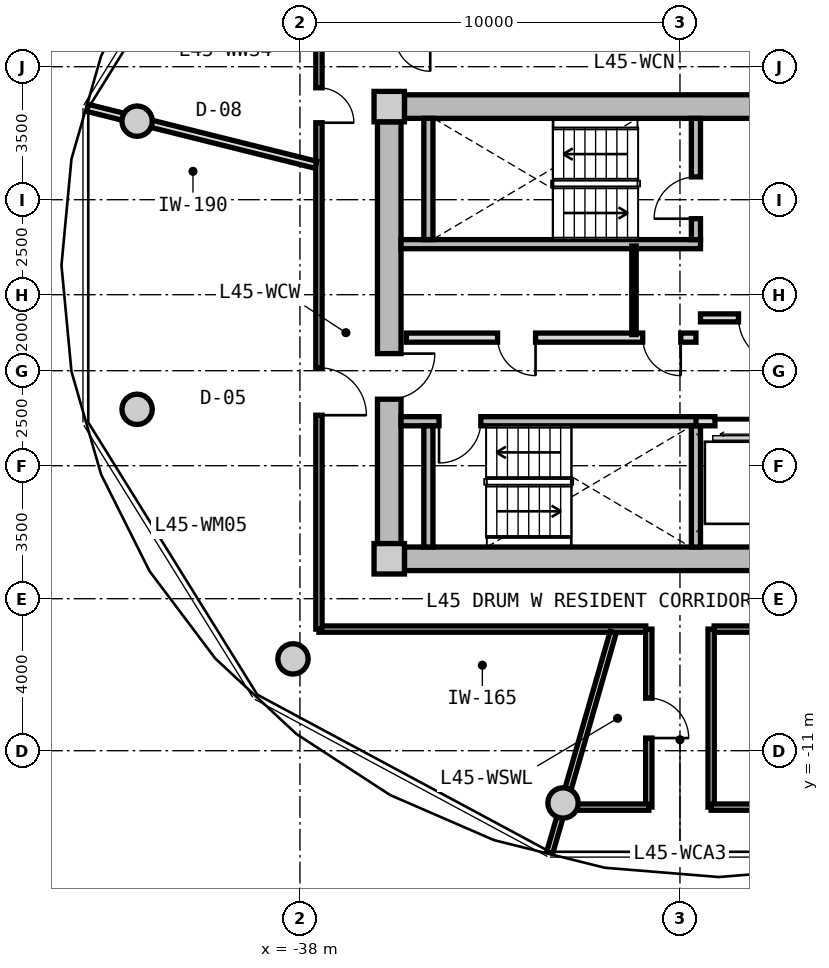
"""IFC4 building model, lengths in metres.
Left out: names, types, materials, properties, quantities, classifications, styles, units other than length and angle.
Written with IfcOpenShell. Run it as: python <this file> out.ifc"""

import sys

from ifc_helpers import new_model, si_unit, direction, frame, frame_2d, origin, origin_2d, place, context, subcontext, project, spatial, rectangle, circle, extrude, source, transform, mapped, element, fill, save


model = new_model("IFC4")
c1 = context("Model", 3, precision=1e-05, world=origin(), true_north=direction((0.0, 1.0)))
c2 = subcontext(c1, "Body", "Model", "MODEL_VIEW")
j1 = project(units=[si_unit("LENGTHUNIT", "METRE"), si_unit("PLANEANGLEUNIT", "RADIAN")], contexts=[c1])
p1 = place(None, origin())
s1 = spatial("IfcSite", under=j1, at=p1, CompositionType="ELEMENT")
p2 = place(p1, origin())
s2 = spatial("IfcBuilding", under=s1, at=p2, CompositionType="ELEMENT")
p3 = place(p2, frame((0.0, 0.0, 146.5)))
s3 = spatial("IfcBuildingStorey", under=s2, at=p3, CompositionType="ELEMENT", Elevation=146.5)
m1 = source(origin(), c2, "Body", "SweptSolid", [
    extrude(rectangle(XDim=0.8, YDim=0.8, at=origin_2d()), origin(), (0.0, 0.0, 1.0), 3.05),
])
for number, where, z_axis, x_axis in (
    (1, (-35.65, -5.95, 0.0), (0.0, 0.0, 1.0), (1.0, 0.0, 0.0)),
    (2, (-35.65, 5.95, 0.0), (0.0, 0.0, 1.0), (1.0, 0.0, 0.0)),
):
    element("IfcColumn", number, at=place(p3, frame(where, z_axis=z_axis, x_axis=x_axis)), inside=s3, PredefinedType="COLUMN", context=c2, shape_type="MappedRepresentation", body=[
        mapped(m1, transform((0.0, 0.0, 0.0), x_axis=(1.0, 0.0, 0.0), y_axis=(0.0, 1.0, 0.0), z_axis=(0.0, 0.0, 1.0), scale=1.0)),
    ])
m2 = source(origin(), c2, "Body", "SweptSolid", [
    extrude(rectangle(XDim=14.5, YDim=0.62, at=frame_2d((7.25, 0.0))), origin(), (0.0, 0.0, 1.0), 2.81),
])
for number, where, z_axis, x_axis in (
    (3, (-35.25, 5.95, 0.0), (0.0, 0.0, 1.0), (1.0, 0.0, 0.0)),
    (4, (-20.75, -5.95, 0.0), (0.0, 0.0, 1.0), (-1.0, 0.0, 0.0)),
):
    element("IfcWall", number, at=place(p3, frame(where, z_axis=z_axis, x_axis=x_axis)), inside=s3, PredefinedType="SHEAR", context=c2, shape_type="MappedRepresentation", body=[
        mapped(m2, transform((0.0, 0.0, 0.0), x_axis=(1.0, 0.0, 0.0), y_axis=(0.0, 1.0, 0.0), z_axis=(0.0, 0.0, 1.0), scale=1.0)),
    ])
m3 = source(origin(), c2, "Body", "SweptSolid", [
    extrude(rectangle(XDim=11.1, YDim=0.62, at=frame_2d((5.55, 0.0))), origin(), (0.0, 0.0, 1.0), 2.81),
])
p4 = place(p3, frame((-35.65, -5.55, 0.0), z_axis=(0.0, 0.0, 1.0), x_axis=(0.0, 1.0, 0.0)))
e5 = element("IfcWall", 5, at=p4, inside=s3, PredefinedType="SHEAR", context=c2, shape_type="MappedRepresentation", body=[
    mapped(m3, transform((0.0, 0.0, 0.0), x_axis=(1.0, 0.0, 0.0), y_axis=(0.0, 1.0, 0.0), z_axis=(0.0, 0.0, 1.0), scale=1.0)),
])
p5 = place(p4, frame((3.8, 0.0, 0.0)))
e6 = element("IfcOpeningElement", 6, at=p5, cuts=e5, PredefinedType="OPENING", context=c2, shape_type="SweptSolid", body=[
    extrude(rectangle(XDim=1.2, YDim=2.15, at=frame_2d((0.6, 1.075))), frame((0.0, 0.32, 0.0), z_axis=(0.0, -1.0, 0.0), x_axis=(1.0, 0.0, 0.0)), (0.0, 0.0, 1.0), 0.64),
])
m4 = source(origin(), c2, "Body", "SweptSolid", [
    extrude(circle(Radius=0.4, at=origin_2d()), origin(), (0.0, 0.0, 1.0), 3.05),
])
for number, where, z_axis, x_axis in (
    (7, (-42.285, 5.567, 0.0), (0.0, 0.0, 1.0), (1.0, 0.0, 0.0)),
    (8, (-42.285, -2.016, 0.0), (0.0, 0.0, 1.0), (1.0, 0.0, 0.0)),
    (9, (-38.183, -8.584, 0.0), (0.0, 0.0, 1.0), (1.0, 0.0, 0.0)),
    (10, (-31.077, -12.375, 0.0), (0.0, 0.0, 1.0), (1.0, 0.0, 0.0)),
):
    element("IfcColumn", number, at=place(p3, frame(where, z_axis=z_axis, x_axis=x_axis)), inside=s3, PredefinedType="COLUMN", context=c2, shape_type="MappedRepresentation", body=[
        mapped(m4, transform((0.0, 0.0, 0.0), x_axis=(1.0, 0.0, 0.0), y_axis=(0.0, 1.0, 0.0), z_axis=(0.0, 0.0, 1.0), scale=1.0)),
    ])
m5 = source(origin(), c2, "Body", "SweptSolid", [
    extrude(rectangle(XDim=7.88, YDim=0.24, at=frame_2d((3.94, 0.0))), origin(), (0.0, 0.0, 1.0), 2.81),
])
p6 = place(p3, frame((-35.34, 2.33, 0.0), z_axis=(0.0, 0.0, 1.0), x_axis=(1.0, 0.0, 0.0)))
e11 = element("IfcWall", 11, at=p6, inside=s3, PredefinedType="PARTITIONING", context=c2, shape_type="MappedRepresentation", body=[
    mapped(m5, transform((0.0, 0.0, 0.0), x_axis=(1.0, 0.0, 0.0), y_axis=(0.0, 1.0, 0.0), z_axis=(0.0, 0.0, 1.0), scale=1.0)),
])
m6 = source(origin(), c2, "Body", "SweptSolid", [
    extrude(rectangle(XDim=3.19, YDim=0.24, at=frame_2d((1.595, 0.0))), origin(), (0.0, 0.0, 1.0), 2.81),
])
p7 = place(p3, frame((-34.62, 2.45, 0.0), z_axis=(0.0, 0.0, 1.0), x_axis=(0.0, 1.0, 0.0)))
e12 = element("IfcWall", 12, at=p7, inside=s3, PredefinedType="PARTITIONING", context=c2, shape_type="MappedRepresentation", body=[
    mapped(m6, transform((0.0, 0.0, 0.0), x_axis=(1.0, 0.0, 0.0), y_axis=(0.0, 1.0, 0.0), z_axis=(0.0, 0.0, 1.0), scale=1.0)),
])
p8 = place(p3, frame((-27.58, 2.45, 0.0), z_axis=(0.0, 0.0, 1.0), x_axis=(0.0, 1.0, 0.0)))
e13 = element("IfcWall", 13, at=p8, inside=s3, PredefinedType="PARTITIONING", context=c2, shape_type="MappedRepresentation", body=[
    mapped(m6, transform((0.0, 0.0, 0.0), x_axis=(1.0, 0.0, 0.0), y_axis=(0.0, 1.0, 0.0), z_axis=(0.0, 0.0, 1.0), scale=1.0)),
])
p9 = place(p8, frame((0.55, 0.0, 0.0)))
e14 = element("IfcOpeningElement", 14, at=p9, cuts=e13, PredefinedType="OPENING", context=c2, shape_type="SweptSolid", body=[
    extrude(rectangle(XDim=1.1, YDim=2.15, at=frame_2d((0.55, 1.075))), frame((0.0, 0.13, 0.0), z_axis=(0.0, -1.0, 0.0), x_axis=(1.0, 0.0, 0.0)), (0.0, 0.0, 1.0), 0.26),
])
p10 = place(p3, frame((-35.34, -2.33, 0.0), z_axis=(0.0, 0.0, 1.0), x_axis=(1.0, 0.0, 0.0)))
e15 = element("IfcWall", 15, at=p10, inside=s3, PredefinedType="PARTITIONING", context=c2, shape_type="MappedRepresentation", body=[
    mapped(m5, transform((0.0, 0.0, 0.0), x_axis=(1.0, 0.0, 0.0), y_axis=(0.0, 1.0, 0.0), z_axis=(0.0, 0.0, 1.0), scale=1.0)),
])
p11 = place(p10, frame((1.0, 0.0, 0.0)))
e16 = element("IfcOpeningElement", 16, at=p11, cuts=e15, PredefinedType="OPENING", context=c2, shape_type="SweptSolid", body=[
    extrude(rectangle(XDim=1.1, YDim=2.15, at=frame_2d((0.55, 1.075))), frame((0.0, 0.13, 0.0), z_axis=(0.0, -1.0, 0.0), x_axis=(1.0, 0.0, 0.0)), (0.0, 0.0, 1.0), 0.26),
])
for number, where, z_axis, x_axis in (
    (17, (-34.62, -5.64, 0.0), (0.0, 0.0, 1.0), (0.0, 1.0, 0.0)),
    (18, (-27.58, -5.64, 0.0), (0.0, 0.0, 1.0), (0.0, 1.0, 0.0)),
):
    element("IfcWall", number, at=place(p3, frame(where, z_axis=z_axis, x_axis=x_axis)), inside=s3, PredefinedType="PARTITIONING", context=c2, shape_type="MappedRepresentation", body=[
        mapped(m6, transform((0.0, 0.0, 0.0), x_axis=(1.0, 0.0, 0.0), y_axis=(0.0, 1.0, 0.0), z_axis=(0.0, 0.0, 1.0), scale=1.0)),
    ])
m7 = source(origin(), c2, "Body", "SweptSolid", [
    extrude(rectangle(XDim=6.66, YDim=0.21, at=frame_2d((3.33, 0.0))), origin(), (0.0, 0.0, 1.0), 2.795),
])
p12 = place(p3, frame((-27.46, 0.39, 0.0), z_axis=(0.0, 0.0, 1.0), x_axis=(1.0, 0.0, 0.0)))
e19 = element("IfcWall", 19, at=p12, inside=s3, PredefinedType="PARTITIONING", context=c2, shape_type="MappedRepresentation", body=[
    mapped(m7, transform((0.0, 0.0, 0.0), x_axis=(1.0, 0.0, 0.0), y_axis=(0.0, 1.0, 0.0), z_axis=(0.0, 0.0, 1.0), scale=1.0)),
])
p13 = place(p12, frame((1.0, 0.0, 0.0)))
e20 = element("IfcOpeningElement", 20, at=p13, cuts=e19, PredefinedType="OPENING", context=c2, shape_type="SweptSolid", body=[
    extrude(rectangle(XDim=1.2, YDim=2.15, at=frame_2d((0.6, 1.075))), frame((0.0, 0.115, 0.0), z_axis=(0.0, -1.0, 0.0), x_axis=(1.0, 0.0, 0.0)), (0.0, 0.0, 1.0), 0.23),
])
m8 = source(origin(), c2, "Body", "SweptSolid", [
    extrude(rectangle(XDim=7.62, YDim=0.24, at=frame_2d((3.81, 0.0))), origin(), (0.0, 0.0, 1.0), 2.795),
])
p14 = place(p3, frame((-35.2, -0.13, 0.0), z_axis=(0.0, 0.0, 1.0), x_axis=(1.0, 0.0, 0.0)))
e21 = element("IfcWall", 21, at=p14, inside=s3, PredefinedType="PARTITIONING", context=c2, shape_type="MappedRepresentation", body=[
    mapped(m8, transform((0.0, 0.0, 0.0), x_axis=(1.0, 0.0, 0.0), y_axis=(0.0, 1.0, 0.0), z_axis=(0.0, 0.0, 1.0), scale=1.0)),
])
p15 = place(p14, frame((6.22, 0.0, 0.0)))
e22 = element("IfcOpeningElement", 22, at=p15, cuts=e21, PredefinedType="OPENING", context=c2, shape_type="SweptSolid", body=[
    extrude(rectangle(XDim=1.0, YDim=2.1, at=frame_2d((0.5, 1.05))), frame((0.0, 0.13, 0.0), z_axis=(0.0, -1.0, 0.0), x_axis=(1.0, 0.0, 0.0)), (0.0, 0.0, 1.0), 0.26),
])
p16 = place(p14, frame((2.4, 0.0, 0.0)))
e23 = element("IfcOpeningElement", 23, at=p16, cuts=e21, PredefinedType="OPENING", context=c2, shape_type="SweptSolid", body=[
    extrude(rectangle(XDim=1.0, YDim=2.1, at=frame_2d((0.5, 1.05))), frame((0.0, 0.13, 0.0), z_axis=(0.0, -1.0, 0.0), x_axis=(1.0, 0.0, 0.0)), (0.0, 0.0, 1.0), 0.26),
])
m9 = source(origin(), c2, "Body", "SweptSolid", [
    extrude(rectangle(XDim=2.33, YDim=0.115, at=frame_2d((1.165, 0.0))), origin(), (0.0, 0.0, 1.0), 2.795),
])
p17 = place(p3, frame((-29.21, -0.05, 0.0), z_axis=(0.0, 0.0, 1.0), x_axis=(0.0, 1.0, 0.0)))
e24 = element("IfcWall", 24, at=p17, inside=s3, PredefinedType="PARTITIONING", context=c2, shape_type="MappedRepresentation", body=[
    mapped(m9, transform((0.0, 0.0, 0.0), x_axis=(1.0, 0.0, 0.0), y_axis=(0.0, 1.0, 0.0), z_axis=(0.0, 0.0, 1.0), scale=1.0)),
])
m10 = source(origin(), c2, "Body", "SweptSolid", [
    extrude(rectangle(XDim=4.13, YDim=0.24, at=frame_2d((2.065, 0.0))), origin(), (0.0, 0.0, 1.0), 2.795),
])
p18 = place(p3, frame((-27.58, -2.33, 0.0), z_axis=(0.0, 0.0, 1.0), x_axis=(1.0, 0.0, 0.0)))
e25 = element("IfcWall", 25, at=p18, inside=s3, PredefinedType="PARTITIONING", context=c2, shape_type="MappedRepresentation", body=[
    mapped(m10, transform((0.0, 0.0, 0.0), x_axis=(1.0, 0.0, 0.0), y_axis=(0.0, 1.0, 0.0), z_axis=(0.0, 0.0, 1.0), scale=1.0)),
])
p19 = place(p18, frame((0.5, 0.0, 0.0)))
e26 = element("IfcOpeningElement", 26, at=p19, cuts=e25, PredefinedType="OPENING", context=c2, shape_type="SweptSolid", body=[
    extrude(rectangle(XDim=1.1, YDim=2.2, at=frame_2d((0.55, 1.1))), frame((0.0, 0.13, 0.0), z_axis=(0.0, -1.0, 0.0), x_axis=(1.0, 0.0, 0.0)), (0.0, 0.0, 1.0), 0.26),
])
m11 = source(origin(), c2, "Body", "SweptSolid", [
    extrude(rectangle(XDim=8.6, YDim=0.165, at=frame_2d((4.3, 0.0))), origin(), (0.0, 0.0, 1.0), 2.795),
])
p20 = place(p3, frame((-18.5, -7.8, 0.0), z_axis=(0.0, 0.0, 1.0), x_axis=(-1.0, 0.0, 0.0)))
e27 = element("IfcWall", 27, at=p20, inside=s3, PredefinedType="PARTITIONING", context=c2, shape_type="MappedRepresentation", body=[
    mapped(m11, transform((0.0, 0.0, 0.0), x_axis=(1.0, 0.0, 0.0), y_axis=(0.0, 1.0, 0.0), z_axis=(0.0, 0.0, 1.0), scale=1.0)),
])
p21 = place(p20, frame((3.775, 0.0, 0.0)))
e28 = element("IfcOpeningElement", 28, at=p21, cuts=e27, PredefinedType="OPENING", context=c2, shape_type="SweptSolid", body=[
    extrude(rectangle(XDim=1.05, YDim=2.15, at=frame_2d((0.525, 1.075))), frame((0.0, 0.093, 0.0), z_axis=(0.0, -1.0, 0.0), x_axis=(1.0, 0.0, 0.0)), (0.0, 0.0, 1.0), 0.185),
])
p22 = place(p3, frame((-28.9, -7.8, 0.0), z_axis=(0.0, 0.0, 1.0), x_axis=(-1.0, 0.0, 0.0)))
e29 = element("IfcWall", 29, at=p22, inside=s3, PredefinedType="PARTITIONING", context=c2, shape_type="MappedRepresentation", body=[
    mapped(m11, transform((0.0, 0.0, 0.0), x_axis=(1.0, 0.0, 0.0), y_axis=(0.0, 1.0, 0.0), z_axis=(0.0, 0.0, 1.0), scale=1.0)),
])
m12 = source(origin(), c2, "Body", "SweptSolid", [
    extrude(rectangle(XDim=15.6, YDim=0.165, at=frame_2d((7.8, 0.0))), origin(), (0.0, 0.0, 1.0), 2.795),
])
p23 = place(p3, frame((-37.5, -7.8, 0.0), z_axis=(0.0, 0.0, 1.0), x_axis=(0.0, 1.0, 0.0)))
e30 = element("IfcWall", 30, at=p23, inside=s3, PredefinedType="PARTITIONING", context=c2, shape_type="MappedRepresentation", body=[
    mapped(m12, transform((0.0, 0.0, 0.0), x_axis=(1.0, 0.0, 0.0), y_axis=(0.0, 1.0, 0.0), z_axis=(0.0, 0.0, 1.0), scale=1.0)),
])
p24 = place(p23, frame((13.325, 0.0, 0.0)))
e31 = element("IfcOpeningElement", 31, at=p24, cuts=e30, PredefinedType="OPENING", context=c2, shape_type="SweptSolid", body=[
    extrude(rectangle(XDim=0.92, YDim=2.1, at=frame_2d((0.46, 1.05))), frame((0.0, 0.093, 0.0), z_axis=(0.0, -1.0, 0.0), x_axis=(1.0, 0.0, 0.0)), (0.0, 0.0, 1.0), 0.185),
])
p25 = place(p23, frame((5.628, 0.0, 0.0)))
e32 = element("IfcOpeningElement", 32, at=p25, cuts=e30, PredefinedType="OPENING", context=c2, shape_type="SweptSolid", body=[
    extrude(rectangle(XDim=1.25, YDim=2.2, at=frame_2d((0.625, 1.1))), frame((0.0, 0.093, 0.0), z_axis=(0.0, -1.0, 0.0), x_axis=(1.0, 0.0, 0.0)), (0.0, 0.0, 1.0), 0.185),
])
m13 = source(origin(), c2, "Body", "SweptSolid", [
    extrude(rectangle(XDim=6.035, YDim=0.165, at=frame_2d((3.018, 0.0))), origin(), (0.0, 0.0, 1.0), 2.345),
])
p26 = place(p3, frame((-29.756, -7.88, 0.0), z_axis=(0.0, 0.0, 1.0), x_axis=(-0.276809454862, -0.960924828329, 0.0)))
e33 = element("IfcWall", 33, at=p26, inside=s3, PredefinedType="PARTITIONING", context=c2, shape_type="MappedRepresentation", body=[
    mapped(m13, transform((0.0, 0.0, 0.0), x_axis=(1.0, 0.0, 0.0), y_axis=(0.0, 1.0, 0.0), z_axis=(0.0, 0.0, 1.0), scale=1.0)),
])
m14 = source(origin(), c2, "Body", "SweptSolid", [
    extrude(rectangle(XDim=4.685, YDim=0.165, at=frame_2d((2.342, 0.0))), origin(), (0.0, 0.0, 1.0), 2.795),
])
p27 = place(p3, frame((-28.82, -12.485, 0.0), z_axis=(0.0, 0.0, 1.0), x_axis=(0.0, 1.0, 0.0)))
e34 = element("IfcWall", 34, at=p27, inside=s3, PredefinedType="PARTITIONING", context=c2, shape_type="MappedRepresentation", body=[
    mapped(m14, transform((0.0, 0.0, 0.0), x_axis=(1.0, 0.0, 0.0), y_axis=(0.0, 1.0, 0.0), z_axis=(0.0, 0.0, 1.0), scale=1.0)),
])
p28 = place(p27, frame((1.817, 0.0, 0.0)))
e35 = element("IfcOpeningElement", 35, at=p28, cuts=e34, PredefinedType="OPENING", context=c2, shape_type="SweptSolid", body=[
    extrude(rectangle(XDim=1.05, YDim=2.15, at=frame_2d((0.525, 1.075))), frame((0.0, 0.093, 0.0), z_axis=(0.0, -1.0, 0.0), x_axis=(1.0, 0.0, 0.0)), (0.0, 0.0, 1.0), 0.185),
])
m15 = source(origin(), c2, "Body", "SweptSolid", [
    extrude(rectangle(XDim=2.419, YDim=0.165, at=frame_2d((1.209, 0.0))), origin(), (0.0, 0.0, 1.0), 2.345),
])
p29 = place(p3, frame((-31.239, -12.485, 0.0), z_axis=(0.0, 0.0, 1.0), x_axis=(1.0, 0.0, 0.0)))
e36 = element("IfcWall", 36, at=p29, inside=s3, PredefinedType="PARTITIONING", context=c2, shape_type="MappedRepresentation", body=[
    mapped(m15, transform((0.0, 0.0, 0.0), x_axis=(1.0, 0.0, 0.0), y_axis=(0.0, 1.0, 0.0), z_axis=(0.0, 0.0, 1.0), scale=1.0)),
])
p30 = place(p3, frame((-27.18, -12.485, 0.0), z_axis=(0.0, 0.0, 1.0), x_axis=(0.0, 1.0, 0.0)))
e37 = element("IfcWall", 37, at=p30, inside=s3, PredefinedType="PARTITIONING", context=c2, shape_type="MappedRepresentation", body=[
    mapped(m14, transform((0.0, 0.0, 0.0), x_axis=(1.0, 0.0, 0.0), y_axis=(0.0, 1.0, 0.0), z_axis=(0.0, 0.0, 1.0), scale=1.0)),
])
m16 = source(origin(), c2, "Body", "SweptSolid", [
    extrude(rectangle(XDim=7.139, YDim=0.165, at=frame_2d((3.569, 0.0))), origin(), (0.0, 0.0, 1.0), 2.345),
])
p31 = place(p3, frame((-27.18, -12.485, 0.0), z_axis=(0.0, 0.0, 1.0), x_axis=(1.0, 0.0, 0.0)))
e38 = element("IfcWall", 38, at=p31, inside=s3, PredefinedType="PARTITIONING", context=c2, shape_type="MappedRepresentation", body=[
    mapped(m16, transform((0.0, 0.0, 0.0), x_axis=(1.0, 0.0, 0.0), y_axis=(0.0, 1.0, 0.0), z_axis=(0.0, 0.0, 1.0), scale=1.0)),
])
m17 = source(origin(), c2, "Body", "SweptSolid", [
    extrude(rectangle(XDim=6.193, YDim=0.19, at=frame_2d((3.096, 0.0))), origin(), (0.0, 0.0, 1.0), 2.345),
])
p32 = place(p3, frame((-37.58, 4.419, 0.0), z_axis=(0.0, 0.0, 1.0), x_axis=(-0.970309243466, 0.241867674657, 0.0)))
e39 = element("IfcWall", 39, at=p32, inside=s3, PredefinedType="PARTITIONING", context=c2, shape_type="MappedRepresentation", body=[
    mapped(m17, transform((0.0, 0.0, 0.0), x_axis=(1.0, 0.0, 0.0), y_axis=(0.0, 1.0, 0.0), z_axis=(0.0, 0.0, 1.0), scale=1.0)),
])
m18 = source(origin(), c2, "Body", "SweptSolid", [
    extrude(rectangle(XDim=1.1, YDim=2.15, at=frame_2d((0.55, 1.075))), frame((0.0, 0.025, 0.0), z_axis=(0.0, -1.0, 0.0), x_axis=(1.0, 0.0, 0.0)), (0.0, 0.0, 1.0), 0.05),
])
p33 = place(p9, origin())
e40 = element("IfcDoor", 40, at=p33, inside=s3, OperationType="SINGLE_SWING_LEFT", PredefinedType="DOOR", context=c2, shape_type="MappedRepresentation", body=[
    mapped(m18, transform((0.0, 0.0, 0.0), x_axis=(1.0, 0.0, 0.0), y_axis=(0.0, 1.0, 0.0), z_axis=(0.0, 0.0, 1.0), scale=1.0)),
])
fill(e14, e40)
p34 = place(p11, frame((1.1, 0.0, 0.0), z_axis=(0.0, 0.0, 1.0), x_axis=(-1.0, 0.0, 0.0)))
e41 = element("IfcDoor", 41, at=p34, inside=s3, OperationType="SINGLE_SWING_RIGHT", PredefinedType="DOOR", context=c2, shape_type="MappedRepresentation", body=[
    mapped(m18, transform((0.0, 0.0, 0.0), x_axis=(1.0, 0.0, 0.0), y_axis=(0.0, 1.0, 0.0), z_axis=(0.0, 0.0, 1.0), scale=1.0)),
])
fill(e16, e41)
m19 = source(origin(), c2, "Body", "SweptSolid", [
    extrude(rectangle(XDim=1.2, YDim=2.15, at=frame_2d((0.6, 1.075))), frame((0.0, 0.025, 0.0), z_axis=(0.0, -1.0, 0.0), x_axis=(1.0, 0.0, 0.0)), (0.0, 0.0, 1.0), 0.05),
])
p35 = place(p13, frame((1.2, 0.0, 0.0), z_axis=(0.0, 0.0, 1.0), x_axis=(-1.0, 0.0, 0.0)))
e42 = element("IfcDoor", 42, at=p35, inside=s3, OperationType="SINGLE_SWING_LEFT", PredefinedType="DOOR", context=c2, shape_type="MappedRepresentation", body=[
    mapped(m19, transform((0.0, 0.0, 0.0), x_axis=(1.0, 0.0, 0.0), y_axis=(0.0, 1.0, 0.0), z_axis=(0.0, 0.0, 1.0), scale=1.0)),
])
fill(e20, e42)
p36 = place(p5, frame((1.2, 0.0, 0.0), z_axis=(0.0, 0.0, 1.0), x_axis=(-1.0, 0.0, 0.0)))
e43 = element("IfcDoor", 43, at=p36, inside=s3, OperationType="SINGLE_SWING_LEFT", PredefinedType="DOOR", context=c2, shape_type="MappedRepresentation", body=[
    mapped(m19, transform((0.0, 0.0, 0.0), x_axis=(1.0, 0.0, 0.0), y_axis=(0.0, 1.0, 0.0), z_axis=(0.0, 0.0, 1.0), scale=1.0)),
])
fill(e6, e43)
m20 = source(origin(), c2, "Body", "SweptSolid", [
    extrude(rectangle(XDim=1.0, YDim=2.1, at=frame_2d((0.5, 1.05))), frame((0.0, 0.025, 0.0), z_axis=(0.0, -1.0, 0.0), x_axis=(1.0, 0.0, 0.0)), (0.0, 0.0, 1.0), 0.05),
])
p37 = place(p15, frame((1.0, 0.0, 0.0), z_axis=(0.0, 0.0, 1.0), x_axis=(-1.0, 0.0, 0.0)))
e44 = element("IfcDoor", 44, at=p37, inside=s3, OperationType="SINGLE_SWING_LEFT", PredefinedType="DOOR", context=c2, shape_type="MappedRepresentation", body=[
    mapped(m20, transform((0.0, 0.0, 0.0), x_axis=(1.0, 0.0, 0.0), y_axis=(0.0, 1.0, 0.0), z_axis=(0.0, 0.0, 1.0), scale=1.0)),
])
fill(e22, e44)
p38 = place(p16, frame((1.0, 0.0, 0.0), z_axis=(0.0, 0.0, 1.0), x_axis=(-1.0, 0.0, 0.0)))
e45 = element("IfcDoor", 45, at=p38, inside=s3, OperationType="SINGLE_SWING_LEFT", PredefinedType="DOOR", context=c2, shape_type="MappedRepresentation", body=[
    mapped(m20, transform((0.0, 0.0, 0.0), x_axis=(1.0, 0.0, 0.0), y_axis=(0.0, 1.0, 0.0), z_axis=(0.0, 0.0, 1.0), scale=1.0)),
])
fill(e23, e45)
m21 = source(origin(), c2, "Body", "SweptSolid", [
    extrude(rectangle(XDim=1.1, YDim=2.2, at=frame_2d((0.55, 1.1))), frame((0.0, 0.025, 0.0), z_axis=(0.0, -1.0, 0.0), x_axis=(1.0, 0.0, 0.0)), (0.0, 0.0, 1.0), 0.05),
])
p39 = place(p19, frame((1.1, 0.0, 0.0), z_axis=(0.0, 0.0, 1.0), x_axis=(-1.0, 0.0, 0.0)))
e46 = element("IfcDoor", 46, at=p39, inside=s3, OperationType="SLIDING_TO_LEFT", PredefinedType="DOOR", context=c2, shape_type="MappedRepresentation", body=[
    mapped(m21, transform((0.0, 0.0, 0.0), x_axis=(1.0, 0.0, 0.0), y_axis=(0.0, 1.0, 0.0), z_axis=(0.0, 0.0, 1.0), scale=1.0)),
])
fill(e26, e46)
m22 = source(origin(), c2, "Body", "SweptSolid", [
    extrude(rectangle(XDim=1.05, YDim=2.15, at=frame_2d((0.525, 1.075))), frame((0.0, 0.025, 0.0), z_axis=(0.0, -1.0, 0.0), x_axis=(1.0, 0.0, 0.0)), (0.0, 0.0, 1.0), 0.05),
])
p40 = place(p28, frame((1.05, 0.0, 0.0), z_axis=(0.0, 0.0, 1.0), x_axis=(-1.0, 0.0, 0.0)))
e47 = element("IfcDoor", 47, at=p40, inside=s3, OperationType="SINGLE_SWING_RIGHT", PredefinedType="DOOR", context=c2, shape_type="MappedRepresentation", body=[
    mapped(m22, transform((0.0, 0.0, 0.0), x_axis=(1.0, 0.0, 0.0), y_axis=(0.0, 1.0, 0.0), z_axis=(0.0, 0.0, 1.0), scale=1.0)),
])
fill(e35, e47)
m23 = source(origin(), c2, "Body", "SweptSolid", [
    extrude(rectangle(XDim=0.92, YDim=2.1, at=frame_2d((0.46, 1.05))), frame((0.0, 0.025, 0.0), z_axis=(0.0, -1.0, 0.0), x_axis=(1.0, 0.0, 0.0)), (0.0, 0.0, 1.0), 0.05),
])
p41 = place(p24, frame((0.92, 0.0, 0.0), z_axis=(0.0, 0.0, 1.0), x_axis=(-1.0, 0.0, 0.0)))
e48 = element("IfcDoor", 48, at=p41, inside=s3, OperationType="SINGLE_SWING_RIGHT", PredefinedType="DOOR", context=c2, shape_type="MappedRepresentation", body=[
    mapped(m23, transform((0.0, 0.0, 0.0), x_axis=(1.0, 0.0, 0.0), y_axis=(0.0, 1.0, 0.0), z_axis=(0.0, 0.0, 1.0), scale=1.0)),
])
fill(e31, e48)
m24 = source(origin(), c2, "Body", "SweptSolid", [
    extrude(rectangle(XDim=1.25, YDim=2.2, at=frame_2d((0.625, 1.1))), frame((0.0, 0.025, 0.0), z_axis=(0.0, -1.0, 0.0), x_axis=(1.0, 0.0, 0.0)), (0.0, 0.0, 1.0), 0.05),
])
p42 = place(p25, frame((1.25, 0.0, 0.0), z_axis=(0.0, 0.0, 1.0), x_axis=(-1.0, 0.0, 0.0)))
e49 = element("IfcDoor", 49, at=p42, inside=s3, OperationType="SINGLE_SWING_RIGHT", PredefinedType="DOOR", context=c2, shape_type="MappedRepresentation", body=[
    mapped(m24, transform((0.0, 0.0, 0.0), x_axis=(1.0, 0.0, 0.0), y_axis=(0.0, 1.0, 0.0), z_axis=(0.0, 0.0, 1.0), scale=1.0)),
])
fill(e32, e49)
save(model, sys.argv[1])
